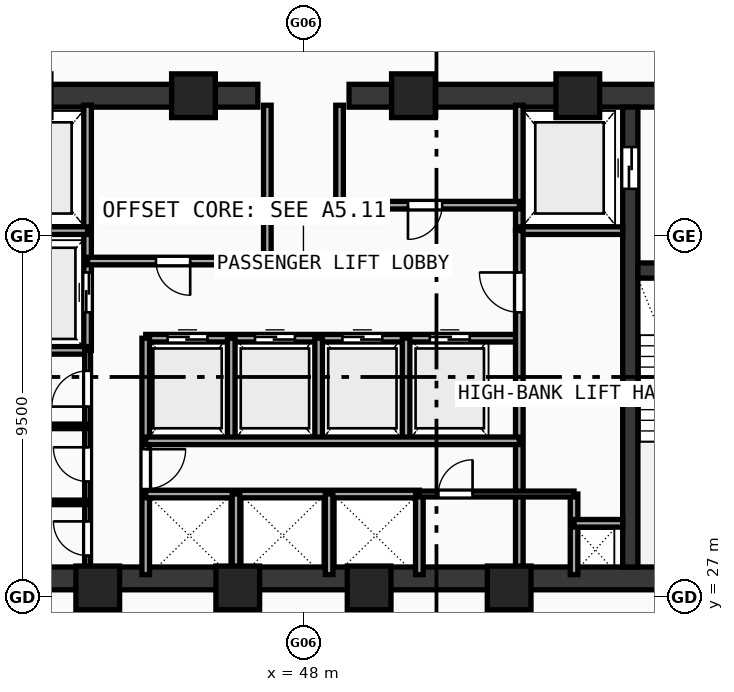
"""IFC4 building model, lengths in metres.
Left out: names, types, materials, properties, quantities, classifications, styles, units other than length and angle.
Written with IfcOpenShell. Run it as: python <this file> out.ifc"""

import sys

from ifc_helpers import new_model, si_unit, direction, frame, frame_2d, origin, origin_with_axes, origin_2d, place, context, subcontext, project, spatial, rectangle, hollow_rectangle, extrude, source, transform, mapped, element, fill, save


model = new_model("IFC4")
c1 = context("Model", 3, precision=1e-05, world=origin(), true_north=direction((0.0, 1.0)))
c2 = subcontext(c1, "Body", "Model", "MODEL_VIEW")
j1 = project(units=[si_unit("LENGTHUNIT", "METRE"), si_unit("PLANEANGLEUNIT", "RADIAN")], contexts=[c1])
p1 = place(None, origin())
s1 = spatial("IfcSite", under=j1, at=p1, CompositionType="ELEMENT")
p2 = place(p1, origin())
s2 = spatial("IfcBuilding", under=s1, at=p2, CompositionType="ELEMENT")
p3 = place(p2, frame((0.0, 0.0, 140.87)))
s3 = spatial("IfcBuildingStorey", under=s2, at=p3, CompositionType="ELEMENT", Elevation=140.87)
p4 = place(p3, frame((35.5, 27.5, 0.0), z_axis=(0.0, 0.0, 1.0), x_axis=(1.0, 0.0, 0.0)))
e1 = element("IfcWall", 1, at=p4, inside=s3, PredefinedType="SHEAR", context=c2, shape_type="SweptSolid", body=[
    extrude(rectangle(XDim=25.0, YDim=0.6, at=frame_2d((12.5, 0.0))), origin(), (0.0, 0.0, 1.0), 3.42),
])
p5 = place(p3, frame((35.5, 40.2, 0.0), z_axis=(0.0, 0.0, 1.0), x_axis=(1.0, 0.0, 0.0)))
e2 = element("IfcWall", 2, at=p5, inside=s3, PredefinedType="SHEAR", context=c2, shape_type="SweptSolid", body=[
    extrude(rectangle(XDim=11.3, YDim=0.6, at=frame_2d((5.65, 0.0))), origin(), (0.0, 0.0, 1.0), 3.42),
])
p6 = place(p5, frame((1.65, 0.0, 0.0)))
e3 = element("IfcOpeningElement", 3, at=p6, cuts=e2, PredefinedType="OPENING", context=c2, shape_type="SweptSolid", body=[
    extrude(rectangle(XDim=1.05, YDim=2.1, at=frame_2d((0.525, 1.05))), frame((0.0, 0.31, 0.0), z_axis=(0.0, -1.0, 0.0), x_axis=(1.0, 0.0, 0.0)), (0.0, 0.0, 1.0), 0.62),
])
p7 = place(p3, frame((49.2, 40.2, 0.0), z_axis=(0.0, 0.0, 1.0), x_axis=(1.0, 0.0, 0.0)))
e4 = element("IfcWall", 4, at=p7, inside=s3, PredefinedType="SHEAR", context=c2, shape_type="SweptSolid", body=[
    extrude(rectangle(XDim=11.3, YDim=0.6, at=frame_2d((5.65, 0.0))), origin(), (0.0, 0.0, 1.0), 3.42),
])
p8 = place(p7, frame((8.6, 0.0, 0.0)))
e5 = element("IfcOpeningElement", 5, at=p8, cuts=e4, PredefinedType="OPENING", context=c2, shape_type="SweptSolid", body=[
    extrude(rectangle(XDim=1.05, YDim=2.1, at=frame_2d((0.525, 1.05))), frame((0.0, 0.31, 0.0), z_axis=(0.0, -1.0, 0.0), x_axis=(1.0, 0.0, 0.0)), (0.0, 0.0, 1.0), 0.62),
])
p9 = place(p3, frame((56.6, 27.8, 0.0), z_axis=(0.0, 0.0, 1.0), x_axis=(0.0, 1.0, 0.0)))
e6 = element("IfcWall", 6, at=p9, inside=s3, PredefinedType="SHEAR", context=c2, shape_type="SweptSolid", body=[
    extrude(rectangle(XDim=12.1, YDim=0.4, at=frame_2d((6.05, 0.0))), origin(), (0.0, 0.0, 1.0), 3.42),
])
p10 = place(p9, frame((9.95, 0.0, 0.0)))
e7 = element("IfcOpeningElement", 7, at=p10, cuts=e6, PredefinedType="OPENING", context=c2, shape_type="SweptSolid", body=[
    extrude(rectangle(XDim=1.1, YDim=2.1, at=frame_2d((0.55, 1.05))), frame((0.0, 0.21, 0.0), z_axis=(0.0, -1.0, 0.0), x_axis=(1.0, 0.0, 0.0)), (0.0, 0.0, 1.0), 0.42),
])
p11 = place(p3, frame((56.8, 35.6, 0.0), z_axis=(0.0, 0.0, 1.0), x_axis=(1.0, 0.0, 0.0)))
e8 = element("IfcWall", 8, at=p11, inside=s3, PredefinedType="SHEAR", context=c2, shape_type="SweptSolid", body=[
    extrude(rectangle(XDim=3.1, YDim=0.4, at=frame_2d((1.55, 0.0))), origin(), (0.0, 0.0, 1.0), 3.42),
])
p12 = place(p11, frame((1.02, 0.0, 0.0)))
e9 = element("IfcOpeningElement", 9, at=p12, cuts=e8, PredefinedType="OPENING", context=c2, shape_type="SweptSolid", body=[
    extrude(rectangle(XDim=1.05, YDim=2.1, at=frame_2d((0.525, 1.05))), frame((0.0, 0.21, 0.0), z_axis=(0.0, -1.0, 0.0), x_axis=(1.0, 0.0, 0.0)), (0.0, 0.0, 1.0), 0.42),
])
m1 = source(origin(), c2, "Body", "SweptSolid", [
    extrude(hollow_rectangle(XDim=1.15, YDim=1.15, WallThickness=0.048, at=origin_2d()), origin(), (0.0, 0.0, 1.0), 3.68),
])
for number, where, z_axis, x_axis in (
    (10, (42.588, 27.25, -0.26), (0.0, 0.0, 1.0), (1.0, 0.0, 0.0)),
    (11, (46.272, 27.25, -0.26), (0.0, 0.0, 1.0), (1.0, 0.0, 0.0)),
    (12, (49.729, 27.25, -0.26), (0.0, 0.0, 1.0), (1.0, 0.0, 0.0)),
    (13, (53.412, 27.25, -0.26), (0.0, 0.0, 1.0), (1.0, 0.0, 0.0)),
    (14, (55.219, 40.2, -0.26), (0.0, 0.0, 1.0), (1.0, 0.0, 0.0)),
    (15, (50.894, 40.2, -0.26), (0.0, 0.0, 1.0), (1.0, 0.0, 0.0)),
    (16, (45.106, 40.2, -0.26), (0.0, 0.0, 1.0), (1.0, 0.0, 0.0)),
):
    element("IfcColumn", number, at=place(p3, frame(where, z_axis=z_axis, x_axis=x_axis)), inside=s3, PredefinedType="COLUMN", context=c2, shape_type="MappedRepresentation", body=[
        mapped(m1, transform((0.0, 0.0, 0.0), scale=1.0)),
    ])
p13 = place(p3, frame((42.32, 33.5, 0.0), z_axis=(0.0, 0.0, 1.0), x_axis=(0.0, 1.0, 0.0)))
e17 = element("IfcWall", 17, at=p13, inside=s3, PredefinedType="SOLIDWALL", context=c2, shape_type="SweptSolid", body=[
    extrude(rectangle(XDim=6.45, YDim=0.2, at=frame_2d((3.225, 0.0))), origin(), (0.0, 0.0, 1.0), 3.42),
])
p14 = place(p13, frame((1.0, 0.0, 0.0)))
e18 = element("IfcOpeningElement", 18, at=p14, cuts=e17, PredefinedType="OPENING", context=c2, shape_type="SweptSolid", body=[
    extrude(rectangle(XDim=1.05, YDim=2.1, at=frame_2d((0.525, 1.05))), frame((0.0, 0.11, 0.0), z_axis=(0.0, -1.0, 0.0), x_axis=(1.0, 0.0, 0.0)), (0.0, 0.0, 1.0), 0.22),
])
for number, where, z_axis, x_axis in (
    (19, (39.6, 36.65, 0.0), (0.0, 0.0, 1.0), (1.0, 0.0, 0.0)),
    (20, (39.6, 33.5, 0.0), (0.0, 0.0, 1.0), (1.0, 0.0, 0.0)),
):
    element("IfcWall", number, at=place(p3, frame(where, z_axis=z_axis, x_axis=x_axis)), inside=s3, PredefinedType="SOLIDWALL", context=c2, shape_type="SweptSolid", body=[
        extrude(rectangle(XDim=2.72, YDim=0.2, at=frame_2d((1.36, 0.0))), origin(), (0.0, 0.0, 1.0), 3.42),
    ])
p15 = place(p3, frame((53.68, 36.65, 0.0), z_axis=(0.0, 0.0, 1.0), x_axis=(0.0, 1.0, 0.0)))
e21 = element("IfcWall", 21, at=p15, inside=s3, PredefinedType="SOLIDWALL", context=c2, shape_type="SweptSolid", body=[
    extrude(rectangle(XDim=3.3, YDim=0.2, at=frame_2d((1.65, 0.0))), origin(), (0.0, 0.0, 1.0), 3.42),
])
p16 = place(p3, frame((53.68, 36.65, 0.0), z_axis=(0.0, 0.0, 1.0), x_axis=(1.0, 0.0, 0.0)))
e22 = element("IfcWall", 22, at=p16, inside=s3, PredefinedType="SOLIDWALL", context=c2, shape_type="SweptSolid", body=[
    extrude(rectangle(XDim=2.72, YDim=0.2, at=frame_2d((1.36, 0.0))), origin(), (0.0, 0.0, 1.0), 3.42),
])
p17 = place(p3, frame((42.32, 35.85, 0.0), z_axis=(0.0, 0.0, 1.0), x_axis=(1.0, 0.0, 0.0)))
e23 = element("IfcWall", 23, at=p17, inside=s3, PredefinedType="SOLIDWALL", context=c2, shape_type="SweptSolid", body=[
    extrude(rectangle(XDim=4.73, YDim=0.2, at=frame_2d((2.365, 0.0))), origin(), (0.0, 0.0, 1.0), 3.42),
])
p18 = place(p17, frame((1.8, 0.0, 0.0)))
e24 = element("IfcOpeningElement", 24, at=p18, cuts=e23, PredefinedType="OPENING", context=c2, shape_type="SweptSolid", body=[
    extrude(rectangle(XDim=0.9, YDim=2.1, at=frame_2d((0.45, 1.05))), frame((0.0, 0.11, 0.0), z_axis=(0.0, -1.0, 0.0), x_axis=(1.0, 0.0, 0.0)), (0.0, 0.0, 1.0), 0.22),
])
p19 = place(p3, frame((48.95, 37.32, 0.0), z_axis=(0.0, 0.0, 1.0), x_axis=(1.0, 0.0, 0.0)))
e25 = element("IfcWall", 25, at=p19, inside=s3, PredefinedType="SOLIDWALL", context=c2, shape_type="SweptSolid", body=[
    extrude(rectangle(XDim=4.73, YDim=0.2, at=frame_2d((2.365, 0.0))), origin(), (0.0, 0.0, 1.0), 3.42),
])
p20 = place(p19, frame((1.8, 0.0, 0.0)))
e26 = element("IfcOpeningElement", 26, at=p20, cuts=e25, PredefinedType="OPENING", context=c2, shape_type="SweptSolid", body=[
    extrude(rectangle(XDim=0.9, YDim=2.1, at=frame_2d((0.45, 1.05))), frame((0.0, 0.11, 0.0), z_axis=(0.0, -1.0, 0.0), x_axis=(1.0, 0.0, 0.0)), (0.0, 0.0, 1.0), 0.22),
])
p21 = place(p3, frame((47.05, 35.85, 0.0), z_axis=(0.0, 0.0, 1.0), x_axis=(0.0, 1.0, 0.0)))
e27 = element("IfcWall", 27, at=p21, inside=s3, PredefinedType="SOLIDWALL", context=c2, shape_type="SweptSolid", body=[
    extrude(rectangle(XDim=4.1, YDim=0.2, at=frame_2d((2.05, 0.0))), origin(), (0.0, 0.0, 1.0), 3.42),
])
p22 = place(p3, frame((48.95, 37.32, 0.0), z_axis=(0.0, 0.0, 1.0), x_axis=(0.0, 1.0, 0.0)))
e28 = element("IfcWall", 28, at=p22, inside=s3, PredefinedType="SOLIDWALL", context=c2, shape_type="SweptSolid", body=[
    extrude(rectangle(XDim=2.63, YDim=0.2, at=frame_2d((1.315, 0.0))), origin(), (0.0, 0.0, 1.0), 3.42),
])
p23 = place(p3, frame((43.85, 33.82, 0.0), z_axis=(0.0, 0.0, 1.0), x_axis=(1.0, 0.0, 0.0)))
e29 = element("IfcWall", 29, at=p23, inside=s3, PredefinedType="SOLIDWALL", context=c2, shape_type="SweptSolid", body=[
    extrude(rectangle(XDim=9.83, YDim=0.2, at=frame_2d((4.915, 0.0))), origin(), (0.0, 0.0, 1.0), 3.42),
])
p24 = place(p23, frame((0.575, 0.0, 0.0)))
e30 = element("IfcOpeningElement", 30, at=p24, cuts=e29, PredefinedType="OPENING", context=c2, shape_type="SweptSolid", body=[
    extrude(rectangle(XDim=1.05, YDim=2.1, at=frame_2d((0.525, 1.05))), frame((0.0, 0.11, 0.0), z_axis=(0.0, -1.0, 0.0), x_axis=(1.0, 0.0, 0.0)), (0.0, 0.0, 1.0), 0.22),
])
p25 = place(p23, frame((2.875, 0.0, 0.0)))
e31 = element("IfcOpeningElement", 31, at=p25, cuts=e29, PredefinedType="OPENING", context=c2, shape_type="SweptSolid", body=[
    extrude(rectangle(XDim=1.05, YDim=2.1, at=frame_2d((0.525, 1.05))), frame((0.0, 0.11, 0.0), z_axis=(0.0, -1.0, 0.0), x_axis=(1.0, 0.0, 0.0)), (0.0, 0.0, 1.0), 0.22),
])
p26 = place(p23, frame((5.175, 0.0, 0.0)))
e32 = element("IfcOpeningElement", 32, at=p26, cuts=e29, PredefinedType="OPENING", context=c2, shape_type="SweptSolid", body=[
    extrude(rectangle(XDim=1.05, YDim=2.1, at=frame_2d((0.525, 1.05))), frame((0.0, 0.11, 0.0), z_axis=(0.0, -1.0, 0.0), x_axis=(1.0, 0.0, 0.0)), (0.0, 0.0, 1.0), 0.22),
])
p27 = place(p23, frame((7.475, 0.0, 0.0)))
e33 = element("IfcOpeningElement", 33, at=p27, cuts=e29, PredefinedType="OPENING", context=c2, shape_type="SweptSolid", body=[
    extrude(rectangle(XDim=1.05, YDim=2.1, at=frame_2d((0.525, 1.05))), frame((0.0, 0.11, 0.0), z_axis=(0.0, -1.0, 0.0), x_axis=(1.0, 0.0, 0.0)), (0.0, 0.0, 1.0), 0.22),
])
p28 = place(p3, frame((43.85, 27.6, 0.0), z_axis=(0.0, 0.0, 1.0), x_axis=(0.0, 1.0, 0.0)))
e34 = element("IfcWall", 34, at=p28, inside=s3, PredefinedType="SOLIDWALL", context=c2, shape_type="SweptSolid", body=[
    extrude(rectangle(XDim=6.22, YDim=0.2, at=frame_2d((3.11, 0.0))), origin(), (0.0, 0.0, 1.0), 3.42),
])
p29 = place(p28, frame((2.25, 0.0, 0.0)))
e35 = element("IfcOpeningElement", 35, at=p29, cuts=e34, PredefinedType="OPENING", context=c2, shape_type="SweptSolid", body=[
    extrude(rectangle(XDim=1.05, YDim=2.1, at=frame_2d((0.525, 1.05))), frame((0.0, 0.11, 0.0), z_axis=(0.0, -1.0, 0.0), x_axis=(1.0, 0.0, 0.0)), (0.0, 0.0, 1.0), 0.22),
])
p30 = place(p3, frame((53.68, 27.6, 0.0), z_axis=(0.0, 0.0, 1.0), x_axis=(0.0, 1.0, 0.0)))
e36 = element("IfcWall", 36, at=p30, inside=s3, PredefinedType="SOLIDWALL", context=c2, shape_type="SweptSolid", body=[
    extrude(rectangle(XDim=9.05, YDim=0.2, at=frame_2d((4.525, 0.0))), origin(), (0.0, 0.0, 1.0), 3.42),
])
p31 = place(p30, frame((6.9, 0.0, 0.0)))
e37 = element("IfcOpeningElement", 37, at=p31, cuts=e36, PredefinedType="OPENING", context=c2, shape_type="SweptSolid", body=[
    extrude(rectangle(XDim=1.05, YDim=2.1, at=frame_2d((0.525, 1.05))), frame((0.0, 0.11, 0.0), z_axis=(0.0, -1.0, 0.0), x_axis=(1.0, 0.0, 0.0)), (0.0, 0.0, 1.0), 0.22),
])
for number, where, z_axis, x_axis in (
    (38, (46.1, 31.12, 0.0), (0.0, 0.0, 1.0), (0.0, 1.0, 0.0)),
    (39, (48.4, 31.12, 0.0), (0.0, 0.0, 1.0), (0.0, 1.0, 0.0)),
    (40, (50.7, 31.12, 0.0), (0.0, 0.0, 1.0), (0.0, 1.0, 0.0)),
):
    element("IfcWall", number, at=place(p3, frame(where, z_axis=z_axis, x_axis=x_axis)), inside=s3, PredefinedType="SOLIDWALL", context=c2, shape_type="SweptSolid", body=[
        extrude(rectangle(XDim=2.7, YDim=0.2, at=frame_2d((1.35, 0.0))), origin(), (0.0, 0.0, 1.0), 3.42),
    ])
p32 = place(p3, frame((43.85, 29.72, 0.0), z_axis=(0.0, 0.0, 1.0), x_axis=(1.0, 0.0, 0.0)))
e41 = element("IfcWall", 41, at=p32, inside=s3, PredefinedType="SOLIDWALL", context=c2, shape_type="SweptSolid", body=[
    extrude(rectangle(XDim=7.2, YDim=0.2, at=frame_2d((3.6, 0.0))), origin(), (0.0, 0.0, 1.0), 3.42),
])
p33 = place(p3, frame((51.05, 27.6, 0.0), z_axis=(0.0, 0.0, 1.0), x_axis=(0.0, 1.0, 0.0)))
e42 = element("IfcWall", 42, at=p33, inside=s3, PredefinedType="SOLIDWALL", context=c2, shape_type="SweptSolid", body=[
    extrude(rectangle(XDim=2.12, YDim=0.2, at=frame_2d((1.06, 0.0))), origin(), (0.0, 0.0, 1.0), 3.42),
])
p34 = place(p3, frame((43.85, 31.12, 0.0), z_axis=(0.0, 0.0, 1.0), x_axis=(1.0, 0.0, 0.0)))
e43 = element("IfcWall", 43, at=p34, inside=s3, PredefinedType="SOLIDWALL", context=c2, shape_type="SweptSolid", body=[
    extrude(rectangle(XDim=9.83, YDim=0.2, at=frame_2d((4.915, 0.0))), origin(), (0.0, 0.0, 1.0), 3.42),
])
for number, where, z_axis, x_axis in (
    (44, (46.225, 27.6, 0.0), (0.0, 0.0, 1.0), (0.0, 1.0, 0.0)),
    (45, (48.675, 27.6, 0.0), (0.0, 0.0, 1.0), (0.0, 1.0, 0.0)),
    (46, (55.12, 27.6, 0.0), (0.0, 0.0, 1.0), (0.0, 1.0, 0.0)),
):
    element("IfcWall", number, at=place(p3, frame(where, z_axis=z_axis, x_axis=x_axis)), inside=s3, PredefinedType="SOLIDWALL", context=c2, shape_type="SweptSolid", body=[
        extrude(rectangle(XDim=2.12, YDim=0.2, at=frame_2d((1.06, 0.0))), origin(), (0.0, 0.0, 1.0), 3.42),
    ])
p35 = place(p3, frame((55.12, 28.95, 0.0), z_axis=(0.0, 0.0, 1.0), x_axis=(1.0, 0.0, 0.0)))
e47 = element("IfcWall", 47, at=p35, inside=s3, PredefinedType="SOLIDWALL", context=c2, shape_type="SweptSolid", body=[
    extrude(rectangle(XDim=1.28, YDim=0.2, at=frame_2d((0.64, 0.0))), origin(), (0.0, 0.0, 1.0), 3.42),
])
p36 = place(p3, frame((42.32, 27.6, 0.0), z_axis=(0.0, 0.0, 1.0), x_axis=(0.0, 1.0, 0.0)))
e48 = element("IfcWall", 48, at=p36, inside=s3, PredefinedType="PARTITIONING", context=c2, shape_type="SweptSolid", body=[
    extrude(rectangle(XDim=5.9, YDim=0.155, at=frame_2d((2.95, 0.0))), origin(), (0.0, 0.0, 1.0), 3.42),
])
p37 = place(p36, frame((0.5, 0.0, 0.0)))
e49 = element("IfcOpeningElement", 49, at=p37, cuts=e48, PredefinedType="OPENING", context=c2, shape_type="SweptSolid", body=[
    extrude(rectangle(XDim=0.9, YDim=2.1, at=frame_2d((0.45, 1.05))), frame((0.0, 0.087, 0.0), z_axis=(0.0, -1.0, 0.0), x_axis=(1.0, 0.0, 0.0)), (0.0, 0.0, 1.0), 0.175),
])
p38 = place(p36, frame((2.45, 0.0, 0.0)))
e50 = element("IfcOpeningElement", 50, at=p38, cuts=e48, PredefinedType="OPENING", context=c2, shape_type="SweptSolid", body=[
    extrude(rectangle(XDim=0.9, YDim=2.1, at=frame_2d((0.45, 1.05))), frame((0.0, 0.087, 0.0), z_axis=(0.0, -1.0, 0.0), x_axis=(1.0, 0.0, 0.0)), (0.0, 0.0, 1.0), 0.175),
])
p39 = place(p36, frame((4.42, 0.0, 0.0)))
e51 = element("IfcOpeningElement", 51, at=p39, cuts=e48, PredefinedType="OPENING", context=c2, shape_type="SweptSolid", body=[
    extrude(rectangle(XDim=0.94, YDim=2.1, at=frame_2d((0.47, 1.05))), frame((0.0, 0.087, 0.0), z_axis=(0.0, -1.0, 0.0), x_axis=(1.0, 0.0, 0.0)), (0.0, 0.0, 1.0), 0.175),
])
p40 = place(p3, frame((51.05, 29.72, 0.0), z_axis=(0.0, 0.0, 1.0), x_axis=(1.0, 0.0, 0.0)))
e52 = element("IfcWall", 52, at=p40, inside=s3, PredefinedType="PARTITIONING", context=c2, shape_type="SweptSolid", body=[
    extrude(rectangle(XDim=4.07, YDim=0.155, at=frame_2d((2.035, 0.0))), origin(), (0.0, 0.0, 1.0), 3.42),
])
p41 = place(p40, frame((0.5, 0.0, 0.0)))
e53 = element("IfcOpeningElement", 53, at=p41, cuts=e52, PredefinedType="OPENING", context=c2, shape_type="SweptSolid", body=[
    extrude(rectangle(XDim=0.9, YDim=2.1, at=frame_2d((0.45, 1.05))), frame((0.0, 0.087, 0.0), z_axis=(0.0, -1.0, 0.0), x_axis=(1.0, 0.0, 0.0)), (0.0, 0.0, 1.0), 0.175),
])
for number, where, z_axis, x_axis in (
    (54, (39.6, 29.5, 0.0), (0.0, 0.0, 1.0), (1.0, 0.0, 0.0)),
    (55, (39.6, 31.5, 0.0), (0.0, 0.0, 1.0), (1.0, 0.0, 0.0)),
):
    element("IfcWall", number, at=place(p3, frame(where, z_axis=z_axis, x_axis=x_axis)), inside=s3, PredefinedType="PARTITIONING", context=c2, shape_type="SweptSolid", body=[
        extrude(rectangle(XDim=2.72, YDim=0.12, at=frame_2d((1.36, 0.0))), origin(), (0.0, 0.0, 1.0), 3.42),
    ])
m2 = source(origin(), c2, "Body", "SweptSolid", [
    extrude(rectangle(XDim=1.1, YDim=2.1, at=frame_2d((0.55, 1.05))), frame((0.0, 0.025, 0.0), z_axis=(0.0, -1.0, 0.0), x_axis=(1.0, 0.0, 0.0)), (0.0, 0.0, 1.0), 0.05),
])
p42 = place(p10, origin_with_axes())
e56 = element("IfcDoor", 56, at=p42, inside=s3, OperationType="DOUBLE_DOOR_SLIDING", PredefinedType="DOOR", context=c2, shape_type="MappedRepresentation", body=[
    mapped(m2, transform((0.0, 0.0, 0.0), scale=1.0)),
])
fill(e7, e56)
m3 = source(origin(), c2, "Body", "SweptSolid", [
    extrude(rectangle(XDim=1.05, YDim=2.1, at=frame_2d((0.525, 1.05))), frame((0.0, 0.025, 0.0), z_axis=(0.0, -1.0, 0.0), x_axis=(1.0, 0.0, 0.0)), (0.0, 0.0, 1.0), 0.05),
])
p43 = place(p14, origin_with_axes())
e57 = element("IfcDoor", 57, at=p43, inside=s3, OperationType="DOUBLE_DOOR_SLIDING", PredefinedType="DOOR", context=c2, shape_type="MappedRepresentation", body=[
    mapped(m3, transform((0.0, 0.0, 0.0), scale=1.0)),
])
fill(e18, e57)
m4 = source(origin(), c2, "Body", "SweptSolid", [
    extrude(rectangle(XDim=0.9, YDim=2.1, at=frame_2d((0.45, 1.05))), frame((0.0, 0.025, 0.0), z_axis=(0.0, -1.0, 0.0), x_axis=(1.0, 0.0, 0.0)), (0.0, 0.0, 1.0), 0.05),
])
p44 = place(p18, frame((0.9, 0.0, 0.0), z_axis=(0.0, 0.0, 1.0), x_axis=(-1.0, 0.0, 0.0)))
e58 = element("IfcDoor", 58, at=p44, inside=s3, OperationType="SINGLE_SWING_LEFT", PredefinedType="DOOR", context=c2, shape_type="MappedRepresentation", body=[
    mapped(m4, transform((0.0, 0.0, 0.0), scale=1.0)),
])
fill(e24, e58)
p45 = place(p20, frame((0.9, 0.0, 0.0), z_axis=(0.0, 0.0, 1.0), x_axis=(-1.0, 0.0, 0.0)))
e59 = element("IfcDoor", 59, at=p45, inside=s3, OperationType="SINGLE_SWING_RIGHT", PredefinedType="DOOR", context=c2, shape_type="MappedRepresentation", body=[
    mapped(m4, transform((0.0, 0.0, 0.0), scale=1.0)),
])
fill(e26, e59)
p46 = place(p24, origin_with_axes())
e60 = element("IfcDoor", 60, at=p46, inside=s3, OperationType="DOUBLE_DOOR_SLIDING", PredefinedType="DOOR", context=c2, shape_type="MappedRepresentation", body=[
    mapped(m3, transform((0.0, 0.0, 0.0), scale=1.0)),
])
fill(e30, e60)
p47 = place(p25, origin_with_axes())
e61 = element("IfcDoor", 61, at=p47, inside=s3, OperationType="DOUBLE_DOOR_SLIDING", PredefinedType="DOOR", context=c2, shape_type="MappedRepresentation", body=[
    mapped(m3, transform((0.0, 0.0, 0.0), scale=1.0)),
])
fill(e31, e61)
p48 = place(p26, origin_with_axes())
e62 = element("IfcDoor", 62, at=p48, inside=s3, OperationType="DOUBLE_DOOR_SLIDING", PredefinedType="DOOR", context=c2, shape_type="MappedRepresentation", body=[
    mapped(m3, transform((0.0, 0.0, 0.0), scale=1.0)),
])
fill(e32, e62)
p49 = place(p27, origin_with_axes())
e63 = element("IfcDoor", 63, at=p49, inside=s3, OperationType="DOUBLE_DOOR_SLIDING", PredefinedType="DOOR", context=c2, shape_type="MappedRepresentation", body=[
    mapped(m3, transform((0.0, 0.0, 0.0), scale=1.0)),
])
fill(e33, e63)
p50 = place(p29, frame((1.05, 0.0, 0.0), z_axis=(0.0, 0.0, 1.0), x_axis=(-1.0, 0.0, 0.0)))
e64 = element("IfcDoor", 64, at=p50, inside=s3, OperationType="SINGLE_SWING_LEFT", PredefinedType="DOOR", context=c2, shape_type="MappedRepresentation", body=[
    mapped(m3, transform((0.0, 0.0, 0.0), scale=1.0)),
])
fill(e35, e64)
p51 = place(p31, origin_with_axes())
e65 = element("IfcDoor", 65, at=p51, inside=s3, OperationType="SINGLE_SWING_RIGHT", PredefinedType="DOOR", context=c2, shape_type="MappedRepresentation", body=[
    mapped(m3, transform((0.0, 0.0, 0.0), scale=1.0)),
])
fill(e37, e65)
p52 = place(p37, origin_with_axes())
e66 = element("IfcDoor", 66, at=p52, inside=s3, OperationType="SINGLE_SWING_RIGHT", PredefinedType="DOOR", context=c2, shape_type="MappedRepresentation", body=[
    mapped(m4, transform((0.0, 0.0, 0.0), scale=1.0)),
])
fill(e49, e66)
p53 = place(p38, origin_with_axes())
e67 = element("IfcDoor", 67, at=p53, inside=s3, OperationType="SINGLE_SWING_RIGHT", PredefinedType="DOOR", context=c2, shape_type="MappedRepresentation", body=[
    mapped(m4, transform((0.0, 0.0, 0.0), scale=1.0)),
])
fill(e50, e67)
m5 = source(origin(), c2, "Body", "SweptSolid", [
    extrude(rectangle(XDim=0.94, YDim=2.1, at=frame_2d((0.47, 1.05))), frame((0.0, 0.025, 0.0), z_axis=(0.0, -1.0, 0.0), x_axis=(1.0, 0.0, 0.0)), (0.0, 0.0, 1.0), 0.05),
])
p54 = place(p39, origin_with_axes())
e68 = element("IfcDoor", 68, at=p54, inside=s3, OperationType="SINGLE_SWING_LEFT", PredefinedType="DOOR", context=c2, shape_type="MappedRepresentation", body=[
    mapped(m5, transform((0.0, 0.0, 0.0), scale=1.0)),
])
fill(e51, e68)
p55 = place(p41, origin_with_axes())
e69 = element("IfcDoor", 69, at=p55, inside=s3, OperationType="SINGLE_SWING_RIGHT", PredefinedType="DOOR", context=c2, shape_type="MappedRepresentation", body=[
    mapped(m4, transform((0.0, 0.0, 0.0), scale=1.0)),
])
fill(e53, e69)
save(model, sys.argv[1])
